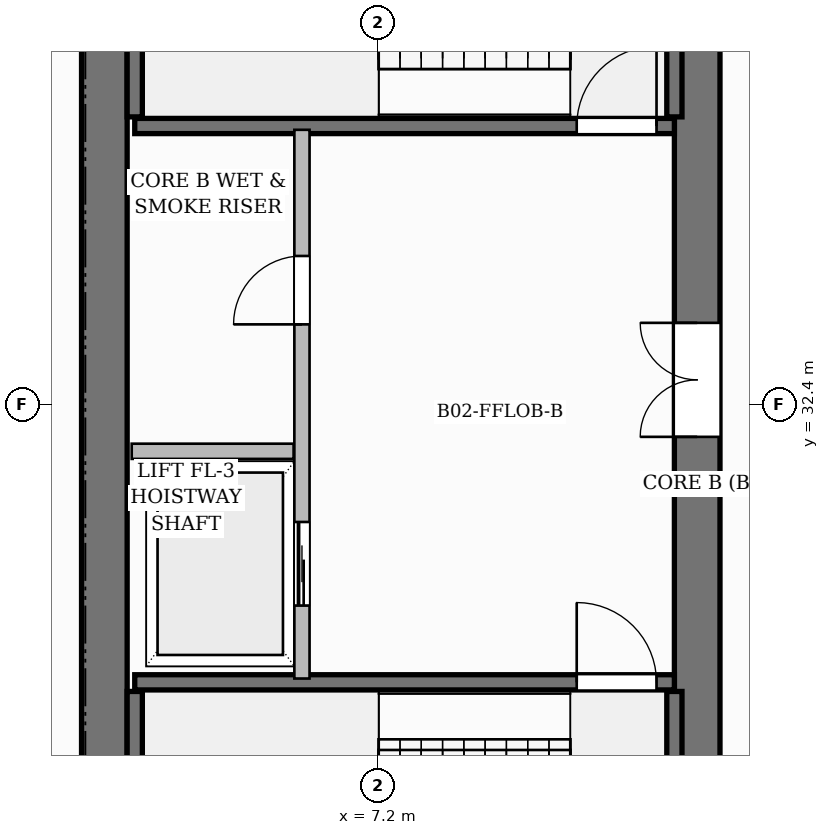
"""IFC4 building model, lengths in metres.
Left out: names, types, materials, properties, quantities, classifications, styles, units other than length and angle.
Written with IfcOpenShell. Run it as: python <this file> out.ifc"""

import sys

from ifc_helpers import new_model, si_unit, direction, frame, frame_2d, origin, place, context, subcontext, project, spatial, rectangle, extrude, source, transform, mapped, element, fill, save


model = new_model("IFC4")
c1 = context("Model", 3, precision=1e-05, world=origin(), true_north=direction((0.0, 1.0)))
c2 = subcontext(c1, "Body", "Model", "MODEL_VIEW")
j1 = project(units=[si_unit("LENGTHUNIT", "METRE"), si_unit("PLANEANGLEUNIT", "RADIAN")], contexts=[c1])
p1 = place(None, origin())
s1 = spatial("IfcSite", under=j1, at=p1, CompositionType="ELEMENT")
p2 = place(p1, origin())
s2 = spatial("IfcBuilding", under=s1, at=p2, CompositionType="ELEMENT")
p3 = place(p2, frame((0.0, 0.0, -13.0)))
s3 = spatial("IfcBuildingStorey", under=s2, at=p3, CompositionType="ELEMENT", Elevation=-13.0)
p4 = place(p3, frame((3.6, 25.5, -0.4), z_axis=(0.0, 0.0, 1.0), x_axis=(0.0, 1.0, 0.0)))
e1 = element("IfcWall", 1, at=p4, inside=s3, PredefinedType="SHEAR", context=c2, shape_type="SweptSolid", body=[
    extrude(rectangle(XDim=13.8, YDim=0.6, at=frame_2d((6.9, 0.0))), origin(), (0.0, 0.0, 1.0), 6.9),
])
p5 = place(p3, frame((11.4, 25.5, -0.4), z_axis=(0.0, 0.0, 1.0), x_axis=(0.0, 1.0, 0.0)))
e2 = element("IfcWall", 2, at=p5, inside=s3, PredefinedType="SHEAR", context=c2, shape_type="SweptSolid", body=[
    extrude(rectangle(XDim=13.8, YDim=0.6, at=frame_2d((6.9, 0.0))), origin(), (0.0, 0.0, 1.0), 6.9),
])
p6 = place(p5, frame((6.47, 0.0, 0.4)))
e3 = element("IfcOpeningElement", 3, at=p6, cuts=e2, PredefinedType="OPENING", context=c2, shape_type="SweptSolid", body=[
    extrude(rectangle(XDim=1.5, YDim=2.2, at=frame_2d((0.75, 1.1))), frame((0.0, 0.31, 0.0), z_axis=(0.0, -1.0, 0.0), x_axis=(1.0, 0.0, 0.0)), (0.0, 0.0, 1.0), 0.62),
])
for number, where, z_axis, x_axis in (
    (4, (4.0, 25.92, -0.4), (0.0, 0.0, 1.0), (0.0, 1.0, 0.0)),
    (5, (11.1, 25.92, -0.4), (0.0, 0.0, 1.0), (0.0, 1.0, 0.0)),
):
    element("IfcWall", number, at=place(p3, frame(where, z_axis=z_axis, x_axis=x_axis)), inside=s3, PredefinedType="SHEAR", context=c2, shape_type="SweptSolid", body=[
        extrude(rectangle(XDim=2.7, YDim=0.2, at=frame_2d((1.35, 0.0))), origin(), (0.0, 0.0, 1.0), 6.9),
    ])
p7 = place(p3, frame((4.0, 28.74, -0.4), z_axis=(0.0, 0.0, 1.0), x_axis=(1.0, 0.0, 0.0)))
e6 = element("IfcWall", 6, at=p7, inside=s3, PredefinedType="SHEAR", context=c2, shape_type="SweptSolid", body=[
    extrude(rectangle(XDim=7.1, YDim=0.2, at=frame_2d((3.55, 0.0))), origin(), (0.0, 0.0, 1.0), 6.9),
])
p8 = place(p7, frame((5.815, 0.0, 0.4)))
e7 = element("IfcOpeningElement", 7, at=p8, cuts=e6, PredefinedType="OPENING", context=c2, shape_type="SweptSolid", body=[
    extrude(rectangle(XDim=1.05, YDim=2.2, at=frame_2d((0.525, 1.1))), frame((0.0, 0.11, 0.0), z_axis=(0.0, -1.0, 0.0), x_axis=(1.0, 0.0, 0.0)), (0.0, 0.0, 1.0), 0.22),
])
for number, where, z_axis, x_axis in (
    (8, (4.0, 36.18, -0.4), (0.0, 0.0, 1.0), (0.0, 1.0, 0.0)),
    (9, (11.1, 36.18, -0.4), (0.0, 0.0, 1.0), (0.0, 1.0, 0.0)),
):
    element("IfcWall", number, at=place(p3, frame(where, z_axis=z_axis, x_axis=x_axis)), inside=s3, PredefinedType="SHEAR", context=c2, shape_type="SweptSolid", body=[
        extrude(rectangle(XDim=2.7, YDim=0.2, at=frame_2d((1.35, 0.0))), origin(), (0.0, 0.0, 1.0), 6.9),
    ])
p9 = place(p3, frame((4.0, 36.06, -0.4), z_axis=(0.0, 0.0, 1.0), x_axis=(1.0, 0.0, 0.0)))
e10 = element("IfcWall", 10, at=p9, inside=s3, PredefinedType="SHEAR", context=c2, shape_type="SweptSolid", body=[
    extrude(rectangle(XDim=7.1, YDim=0.2, at=frame_2d((3.55, 0.0))), origin(), (0.0, 0.0, 1.0), 6.9),
])
p10 = place(p9, frame((5.815, 0.0, 0.4)))
e11 = element("IfcOpeningElement", 11, at=p10, cuts=e10, PredefinedType="OPENING", context=c2, shape_type="SweptSolid", body=[
    extrude(rectangle(XDim=1.05, YDim=2.2, at=frame_2d((0.525, 1.1))), frame((0.0, 0.11, 0.0), z_axis=(0.0, -1.0, 0.0), x_axis=(1.0, 0.0, 0.0)), (0.0, 0.0, 1.0), 0.22),
])
p11 = place(p3, frame((6.2, 28.79, 0.0), z_axis=(0.0, 0.0, 1.0), x_axis=(0.0, 1.0, 0.0)))
e12 = element("IfcWall", 12, at=p11, inside=s3, PredefinedType="PARTITIONING", context=c2, shape_type="SweptSolid", body=[
    extrude(rectangle(XDim=7.22, YDim=0.2, at=frame_2d((3.61, 0.0))), origin(), (0.0, 0.0, 1.0), 6.1),
])
p12 = place(p11, frame((4.66, 0.0, 0.0)))
e13 = element("IfcOpeningElement", 13, at=p12, cuts=e12, PredefinedType="OPENING", context=c2, shape_type="SweptSolid", body=[
    extrude(rectangle(XDim=0.9, YDim=2.1, at=frame_2d((0.45, 1.05))), frame((0.0, 0.11, 0.0), z_axis=(0.0, -1.0, 0.0), x_axis=(1.0, 0.0, 0.0)), (0.0, 0.0, 1.0), 0.22),
])
p13 = place(p11, frame((0.96, 0.0, 0.0)))
e14 = element("IfcOpeningElement", 14, at=p13, cuts=e12, PredefinedType="OPENING", context=c2, shape_type="SweptSolid", body=[
    extrude(rectangle(XDim=1.1, YDim=2.2, at=frame_2d((0.55, 1.1))), frame((0.0, 0.11, 0.0), z_axis=(0.0, -1.0, 0.0), x_axis=(1.0, 0.0, 0.0)), (0.0, 0.0, 1.0), 0.22),
])
p14 = place(p3, frame((3.96, 31.78, 0.0), z_axis=(0.0, 0.0, 1.0), x_axis=(1.0, 0.0, 0.0)))
e15 = element("IfcWall", 15, at=p14, inside=s3, PredefinedType="PARTITIONING", context=c2, shape_type="SweptSolid", body=[
    extrude(rectangle(XDim=2.13, YDim=0.2, at=frame_2d((1.065, 0.0))), origin(), (0.0, 0.0, 1.0), 6.1),
])
m1 = source(origin(), c2, "Body", "SweptSolid", [
    extrude(rectangle(XDim=1.05, YDim=2.2, at=frame_2d((0.525, 1.1))), frame((0.0, 0.025, 0.0), z_axis=(0.0, -1.0, 0.0), x_axis=(1.0, 0.0, 0.0)), (0.0, 0.0, 1.0), 0.05),
])
p15 = place(p8, origin())
e16 = element("IfcDoor", 16, at=p15, inside=s3, OperationType="SINGLE_SWING_LEFT", PredefinedType="DOOR", context=c2, shape_type="MappedRepresentation", body=[
    mapped(m1, transform((0.0, 0.0, 0.0), scale=1.0)),
])
fill(e7, e16)
p16 = place(p10, origin())
e17 = element("IfcDoor", 17, at=p16, inside=s3, OperationType="SINGLE_SWING_RIGHT", PredefinedType="DOOR", context=c2, shape_type="MappedRepresentation", body=[
    mapped(m1, transform((0.0, 0.0, 0.0), scale=1.0)),
])
fill(e11, e17)
m2 = source(origin(), c2, "Body", "SweptSolid", [
    extrude(rectangle(XDim=0.9, YDim=2.1, at=frame_2d((0.45, 1.05))), frame((0.0, 0.025, 0.0), z_axis=(0.0, -1.0, 0.0), x_axis=(1.0, 0.0, 0.0)), (0.0, 0.0, 1.0), 0.05),
])
p17 = place(p12, origin())
e18 = element("IfcDoor", 18, at=p17, inside=s3, OperationType="SINGLE_SWING_LEFT", PredefinedType="DOOR", context=c2, shape_type="MappedRepresentation", body=[
    mapped(m2, transform((0.0, 0.0, 0.0), scale=1.0)),
])
fill(e13, e18)
m3 = source(origin(), c2, "Body", "SweptSolid", [
    extrude(rectangle(XDim=1.5, YDim=2.2, at=frame_2d((0.75, 1.1))), frame((0.0, 0.025, 0.0), z_axis=(0.0, -1.0, 0.0), x_axis=(1.0, 0.0, 0.0)), (0.0, 0.0, 1.0), 0.05),
])
p18 = place(p6, origin())
e19 = element("IfcDoor", 19, at=p18, inside=s3, OperationType="DOUBLE_DOOR_SINGLE_SWING", PredefinedType="DOOR", context=c2, shape_type="MappedRepresentation", body=[
    mapped(m3, transform((0.0, 0.0, 0.0), scale=1.0)),
])
fill(e3, e19)
m4 = source(origin(), c2, "Body", "SweptSolid", [
    extrude(rectangle(XDim=1.1, YDim=2.2, at=frame_2d((0.55, 1.1))), frame((0.0, 0.025, 0.0), z_axis=(0.0, -1.0, 0.0), x_axis=(1.0, 0.0, 0.0)), (0.0, 0.0, 1.0), 0.05),
])
p19 = place(p13, origin())
e20 = element("IfcDoor", 20, at=p19, inside=s3, OperationType="SLIDING_TO_LEFT", PredefinedType="DOOR", context=c2, shape_type="MappedRepresentation", body=[
    mapped(m4, transform((0.0, 0.0, 0.0), scale=1.0)),
])
fill(e14, e20)
save(model, sys.argv[1])
